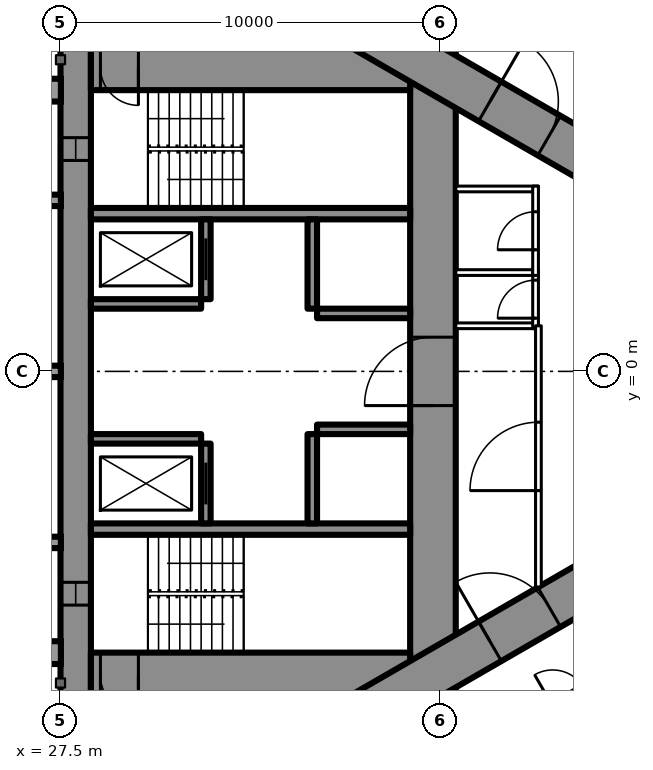
"""IFC4 building model, lengths in metres.
Left out: names, types, materials, properties, quantities, classifications, styles, units other than length and angle.
Written with IfcOpenShell. Run it as: python <this file> out.ifc"""

import sys

from ifc_helpers import new_model, si_unit, direction, frame, frame_2d, origin, place, context, subcontext, project, spatial, rectangle, extrude, element, fill, save


model = new_model("IFC4")
c1 = context("Model", 3, precision=1e-05, world=origin(), true_north=direction((0.0, 1.0)))
c2 = subcontext(c1, "Body", "Model", "MODEL_VIEW")
j1 = project(units=[si_unit("LENGTHUNIT", "METRE"), si_unit("PLANEANGLEUNIT", "RADIAN")], contexts=[c1])
p1 = place(None, origin())
s1 = spatial("IfcSite", under=j1, at=p1, CompositionType="ELEMENT")
p2 = place(p1, origin())
s2 = spatial("IfcBuilding", under=s1, at=p2, CompositionType="ELEMENT")
p3 = place(p2, frame((0.0, 0.0, 32.0)))
s3 = spatial("IfcBuildingStorey", under=s2, at=p3, CompositionType="ELEMENT", Elevation=32.0)
p4 = place(p3, frame((27.9, -8.6, 0.0), z_axis=(0.0, 0.0, 1.0), x_axis=(0.0, 1.0, 0.0)))
e1 = element("IfcWall", 1, at=p4, inside=s3, PredefinedType="SHEAR", context=c2, shape_type="SweptSolid", body=[
    extrude(rectangle(XDim=17.2, YDim=0.8, at=frame_2d((8.6, 0.0))), origin(), (0.0, 0.0, 1.0), 3.5),
])
p5 = place(p4, frame((2.45, 0.0, 0.6)))
e2 = element("IfcOpeningElement", 2, at=p5, cuts=e1, PredefinedType="OPENING", context=c2, shape_type="SweptSolid", body=[
    extrude(rectangle(XDim=0.6, YDim=2.1, at=frame_2d((0.3, 1.05))), frame((0.0, 0.41, 0.0), z_axis=(0.0, -1.0, 0.0), x_axis=(1.0, 0.0, 0.0)), (0.0, 0.0, 1.0), 0.82),
])
p6 = place(p4, frame((14.15, 0.0, 0.6)))
e3 = element("IfcOpeningElement", 3, at=p6, cuts=e1, PredefinedType="OPENING", context=c2, shape_type="SweptSolid", body=[
    extrude(rectangle(XDim=0.6, YDim=2.1, at=frame_2d((0.3, 1.05))), frame((0.0, 0.41, 0.0), z_axis=(0.0, -1.0, 0.0), x_axis=(1.0, 0.0, 0.0)), (0.0, 0.0, 1.0), 0.82),
])
p7 = place(p3, frame((37.3, -8.6, 0.0), z_axis=(0.0, 0.0, 1.0), x_axis=(0.0, 1.0, 0.0)))
e4 = element("IfcWall", 4, at=p7, inside=s3, PredefinedType="SHEAR", context=c2, shape_type="SweptSolid", body=[
    extrude(rectangle(XDim=17.2, YDim=1.2, at=frame_2d((8.6, 0.0))), origin(), (0.0, 0.0, 1.0), 3.5),
])
p8 = place(p7, frame((7.7, 0.0, 0.0)))
e5 = element("IfcOpeningElement", 5, at=p8, cuts=e4, PredefinedType="OPENING", context=c2, shape_type="SweptSolid", body=[
    extrude(rectangle(XDim=1.8, YDim=2.2, at=frame_2d((0.9, 1.1))), frame((0.0, 0.61, 0.0), z_axis=(0.0, -1.0, 0.0), x_axis=(1.0, 0.0, 0.0)), (0.0, 0.0, 1.0), 1.22),
])
p9 = place(p3, frame((28.3, -8.0, 0.0), z_axis=(0.0, 0.0, 1.0), x_axis=(1.0, 0.0, 0.0)))
e6 = element("IfcWall", 6, at=p9, inside=s3, PredefinedType="SHEAR", context=c2, shape_type="SweptSolid", body=[
    extrude(rectangle(XDim=8.4, YDim=1.2, at=frame_2d((4.2, 0.0))), origin(), (0.0, 0.0, 1.0), 3.5),
])
p10 = place(p9, frame((0.25, 0.0, 0.0)))
e7 = element("IfcOpeningElement", 7, at=p10, cuts=e6, PredefinedType="OPENING", context=c2, shape_type="SweptSolid", body=[
    extrude(rectangle(XDim=1.0, YDim=2.2, at=frame_2d((0.5, 1.1))), frame((0.0, 0.61, 0.0), z_axis=(0.0, -1.0, 0.0), x_axis=(1.0, 0.0, 0.0)), (0.0, 0.0, 1.0), 1.22),
])
p11 = place(p3, frame((28.3, 8.0, 0.0), z_axis=(0.0, 0.0, 1.0), x_axis=(1.0, 0.0, 0.0)))
e8 = element("IfcWall", 8, at=p11, inside=s3, PredefinedType="SHEAR", context=c2, shape_type="SweptSolid", body=[
    extrude(rectangle(XDim=8.4, YDim=1.2, at=frame_2d((4.2, 0.0))), origin(), (0.0, 0.0, 1.0), 3.5),
])
p12 = place(p11, frame((0.25, 0.0, 0.0)))
e9 = element("IfcOpeningElement", 9, at=p12, cuts=e8, PredefinedType="OPENING", context=c2, shape_type="SweptSolid", body=[
    extrude(rectangle(XDim=1.0, YDim=2.2, at=frame_2d((0.5, 1.1))), frame((0.0, 0.61, 0.0), z_axis=(0.0, -1.0, 0.0), x_axis=(1.0, 0.0, 0.0)), (0.0, 0.0, 1.0), 1.22),
])
for number, where, z_axis, x_axis in (
    (10, (28.3, -4.15, 0.0), (0.0, 0.0, 1.0), (1.0, 0.0, 0.0)),
    (11, (28.3, 4.15, 0.0), (0.0, 0.0, 1.0), (1.0, 0.0, 0.0)),
):
    element("IfcWall", number, at=place(p3, frame(where, z_axis=z_axis, x_axis=x_axis)), inside=s3, PredefinedType="SHEAR", context=c2, shape_type="SweptSolid", body=[
        extrude(rectangle(XDim=8.4, YDim=0.3, at=frame_2d((4.2, 0.0))), origin(), (0.0, 0.0, 1.0), 3.5),
    ])
p13 = place(p3, frame((31.325, -4.0, 0.0), z_axis=(0.0, 0.0, 1.0), x_axis=(0.0, 1.0, 0.0)))
e12 = element("IfcWall", 12, at=p13, inside=s3, PredefinedType="SHEAR", context=c2, shape_type="SweptSolid", body=[
    extrude(rectangle(XDim=2.1, YDim=0.25, at=frame_2d((1.05, 0.0))), origin(), (0.0, 0.0, 1.0), 3.5),
])
p14 = place(p13, frame((0.5, 0.0, 0.0)))
e13 = element("IfcOpeningElement", 13, at=p14, cuts=e12, PredefinedType="OPENING", context=c2, shape_type="SweptSolid", body=[
    extrude(rectangle(XDim=1.1, YDim=2.2, at=frame_2d((0.55, 1.1))), frame((0.0, 0.135, 0.0), z_axis=(0.0, -1.0, 0.0), x_axis=(1.0, 0.0, 0.0)), (0.0, 0.0, 1.0), 0.27),
])
p15 = place(p3, frame((34.125, -4.0, 0.0), z_axis=(0.0, 0.0, 1.0), x_axis=(0.0, 1.0, 0.0)))
e14 = element("IfcWall", 14, at=p15, inside=s3, PredefinedType="SHEAR", context=c2, shape_type="SweptSolid", body=[
    extrude(rectangle(XDim=2.35, YDim=0.25, at=frame_2d((1.175, 0.0))), origin(), (0.0, 0.0, 1.0), 3.5),
])
p16 = place(p3, frame((28.3, -1.775, 0.0), z_axis=(0.0, 0.0, 1.0), x_axis=(1.0, 0.0, 0.0)))
e15 = element("IfcWall", 15, at=p16, inside=s3, PredefinedType="SHEAR", context=c2, shape_type="SweptSolid", body=[
    extrude(rectangle(XDim=2.9, YDim=0.25, at=frame_2d((1.45, 0.0))), origin(), (0.0, 0.0, 1.0), 3.5),
])
p17 = place(p3, frame((34.25, -1.525, 0.0), z_axis=(0.0, 0.0, 1.0), x_axis=(1.0, 0.0, 0.0)))
e16 = element("IfcWall", 16, at=p17, inside=s3, PredefinedType="SHEAR", context=c2, shape_type="SweptSolid", body=[
    extrude(rectangle(XDim=2.45, YDim=0.25, at=frame_2d((1.225, 0.0))), origin(), (0.0, 0.0, 1.0), 3.5),
])
p18 = place(p3, frame((31.325, 1.9, 0.0), z_axis=(0.0, 0.0, 1.0), x_axis=(0.0, 1.0, 0.0)))
e17 = element("IfcWall", 17, at=p18, inside=s3, PredefinedType="SHEAR", context=c2, shape_type="SweptSolid", body=[
    extrude(rectangle(XDim=2.1, YDim=0.25, at=frame_2d((1.05, 0.0))), origin(), (0.0, 0.0, 1.0), 3.5),
])
p19 = place(p18, frame((0.5, 0.0, 0.0)))
e18 = element("IfcOpeningElement", 18, at=p19, cuts=e17, PredefinedType="OPENING", context=c2, shape_type="SweptSolid", body=[
    extrude(rectangle(XDim=1.1, YDim=2.2, at=frame_2d((0.55, 1.1))), frame((0.0, 0.135, 0.0), z_axis=(0.0, -1.0, 0.0), x_axis=(1.0, 0.0, 0.0)), (0.0, 0.0, 1.0), 0.27),
])
p20 = place(p3, frame((34.125, 1.65, 0.0), z_axis=(0.0, 0.0, 1.0), x_axis=(0.0, 1.0, 0.0)))
e19 = element("IfcWall", 19, at=p20, inside=s3, PredefinedType="SHEAR", context=c2, shape_type="SweptSolid", body=[
    extrude(rectangle(XDim=2.35, YDim=0.25, at=frame_2d((1.175, 0.0))), origin(), (0.0, 0.0, 1.0), 3.5),
])
p21 = place(p3, frame((28.3, 1.775, 0.0), z_axis=(0.0, 0.0, 1.0), x_axis=(1.0, 0.0, 0.0)))
e20 = element("IfcWall", 20, at=p21, inside=s3, PredefinedType="SHEAR", context=c2, shape_type="SweptSolid", body=[
    extrude(rectangle(XDim=2.9, YDim=0.25, at=frame_2d((1.45, 0.0))), origin(), (0.0, 0.0, 1.0), 3.5),
])
p22 = place(p3, frame((34.25, 1.525, 0.0), z_axis=(0.0, 0.0, 1.0), x_axis=(1.0, 0.0, 0.0)))
e21 = element("IfcWall", 21, at=p22, inside=s3, PredefinedType="SHEAR", context=c2, shape_type="SweptSolid", body=[
    extrude(rectangle(XDim=2.45, YDim=0.25, at=frame_2d((1.225, 0.0))), origin(), (0.0, 0.0, 1.0), 3.5),
])
p23 = place(p3, frame((27.2, -13.8, 0.0), z_axis=(0.0, 0.0, 1.0), x_axis=(0.866027159892, 0.499996958321, 0.0)))
e22 = element("IfcWall", 22, at=p23, inside=s3, PredefinedType="SHEAR", context=c2, shape_type="SweptSolid", body=[
    extrude(rectangle(XDim=27.947, YDim=1.2, at=frame_2d((13.973, 0.0))), origin(), (0.0, 0.0, 1.0), 3.5),
])
p24 = place(p23, frame((4.6, 0.0, 0.0)))
e23 = element("IfcOpeningElement", 23, at=p24, cuts=e22, PredefinedType="OPENING", context=c2, shape_type="SweptSolid", body=[
    extrude(rectangle(XDim=1.0, YDim=2.2, at=frame_2d((0.5, 1.1))), frame((0.0, 0.61, 0.0), z_axis=(0.0, -1.0, 0.0), x_axis=(1.0, 0.0, 0.0)), (0.0, 0.0, 1.0), 1.22),
])
p25 = place(p23, frame((13.395, 0.0, 0.0)))
e24 = element("IfcOpeningElement", 24, at=p25, cuts=e22, PredefinedType="OPENING", context=c2, shape_type="SweptSolid", body=[
    extrude(rectangle(XDim=1.8, YDim=2.2, at=frame_2d((0.9, 1.1))), frame((0.0, 0.61, 0.0), z_axis=(0.0, -1.0, 0.0), x_axis=(1.0, 0.0, 0.0)), (0.0, 0.0, 1.0), 1.22),
])
p26 = place(p3, frame((27.2, 13.8, 0.0), z_axis=(0.0, 0.0, 1.0), x_axis=(0.866024515034, -0.500001539357, 0.0)))
e25 = element("IfcWall", 25, at=p26, inside=s3, PredefinedType="SHEAR", context=c2, shape_type="SweptSolid", body=[
    extrude(rectangle(XDim=26.907, YDim=1.2, at=frame_2d((13.454, 0.0))), origin(), (0.0, 0.0, 1.0), 3.5),
])
p27 = place(p26, frame((4.6, 0.0, 0.0)))
e26 = element("IfcOpeningElement", 26, at=p27, cuts=e25, PredefinedType="OPENING", context=c2, shape_type="SweptSolid", body=[
    extrude(rectangle(XDim=1.0, YDim=2.2, at=frame_2d((0.5, 1.1))), frame((0.0, 0.61, 0.0), z_axis=(0.0, -1.0, 0.0), x_axis=(1.0, 0.0, 0.0)), (0.0, 0.0, 1.0), 1.22),
])
p28 = place(p26, frame((13.395, 0.0, 0.0)))
e27 = element("IfcOpeningElement", 27, at=p28, cuts=e25, PredefinedType="OPENING", context=c2, shape_type="SweptSolid", body=[
    extrude(rectangle(XDim=1.8, YDim=2.2, at=frame_2d((0.9, 1.1))), frame((0.0, 0.61, 0.0), z_axis=(0.0, -1.0, 0.0), x_axis=(1.0, 0.0, 0.0)), (0.0, 0.0, 1.0), 1.22),
])
p29 = place(p3, frame((37.96, -10.243, 0.0), z_axis=(0.0, 0.0, 1.0), x_axis=(0.866026429433, 0.499998223521, 0.0)))
e28 = element("IfcWall", 28, at=p29, inside=s3, PredefinedType="PARTITIONING", context=c2, shape_type="SweptSolid", body=[
    extrude(rectangle(XDim=20.487, YDim=0.2, at=frame_2d((10.243, 0.0))), origin(), (0.0, 0.0, 1.0), 3.25),
])
p30 = place(p29, frame((4.575, 0.0, 0.0)))
e29 = element("IfcOpeningElement", 29, at=p30, cuts=e28, PredefinedType="OPENING", context=c2, shape_type="SweptSolid", body=[
    extrude(rectangle(XDim=0.95, YDim=2.2, at=frame_2d((0.475, 1.1))), frame((0.0, 0.11, 0.0), z_axis=(0.0, -1.0, 0.0), x_axis=(1.0, 0.0, 0.0)), (0.0, 0.0, 1.0), 0.22),
])
p31 = place(p29, frame((9.199, 0.0, 0.0)))
e30 = element("IfcOpeningElement", 30, at=p31, cuts=e28, PredefinedType="OPENING", context=c2, shape_type="SweptSolid", body=[
    extrude(rectangle(XDim=0.95, YDim=2.2, at=frame_2d((0.475, 1.1))), frame((0.0, 0.11, 0.0), z_axis=(0.0, -1.0, 0.0), x_axis=(1.0, 0.0, 0.0)), (0.0, 0.0, 1.0), 0.22),
])
p32 = place(p29, frame((15.599, 0.0, 0.0)))
e31 = element("IfcOpeningElement", 31, at=p32, cuts=e28, PredefinedType="OPENING", context=c2, shape_type="SweptSolid", body=[
    extrude(rectangle(XDim=0.95, YDim=2.2, at=frame_2d((0.475, 1.1))), frame((0.0, 0.11, 0.0), z_axis=(0.0, -1.0, 0.0), x_axis=(1.0, 0.0, 0.0)), (0.0, 0.0, 1.0), 0.22),
])
p33 = place(p29, frame((2.875, 0.0, 0.0)))
e32 = element("IfcOpeningElement", 32, at=p33, cuts=e28, PredefinedType="OPENING", context=c2, shape_type="SweptSolid", body=[
    extrude(rectangle(XDim=0.95, YDim=2.2, at=frame_2d((0.475, 1.1))), frame((0.0, 0.11, 0.0), z_axis=(0.0, -1.0, 0.0), x_axis=(1.0, 0.0, 0.0)), (0.0, 0.0, 1.0), 0.22),
])
for number, where, z_axis, x_axis in (
    (33, (37.9, 1.2, 0.0), (0.0, 0.0, 1.0), (1.0, 0.0, 0.0)),
    (34, (37.9, 2.6, 0.0), (0.0, 0.0, 1.0), (1.0, 0.0, 0.0)),
    (35, (37.9, 4.8, 0.0), (0.0, 0.0, 1.0), (1.0, 0.0, 0.0)),
):
    element("IfcWall", number, at=place(p3, frame(where, z_axis=z_axis, x_axis=x_axis)), inside=s3, PredefinedType="PARTITIONING", context=c2, shape_type="SweptSolid", body=[
        extrude(rectangle(XDim=2.175, YDim=0.15, at=frame_2d((1.087, 0.0))), origin(), (0.0, 0.0, 1.0), 3.25),
    ])
p34 = place(p3, frame((40.0, 1.125, 0.0), z_axis=(0.0, 0.0, 1.0), x_axis=(0.0, 1.0, 0.0)))
e36 = element("IfcWall", 36, at=p34, inside=s3, PredefinedType="PARTITIONING", context=c2, shape_type="SweptSolid", body=[
    extrude(rectangle(XDim=1.55, YDim=0.15, at=frame_2d((0.775, 0.0))), origin(), (0.0, 0.0, 1.0), 3.25),
])
p35 = place(p34, frame((0.275, 0.0, 0.0)))
e37 = element("IfcOpeningElement", 37, at=p35, cuts=e36, PredefinedType="OPENING", context=c2, shape_type="SweptSolid", body=[
    extrude(rectangle(XDim=1.0, YDim=2.2, at=frame_2d((0.5, 1.1))), frame((0.0, 0.085, 0.0), z_axis=(0.0, -1.0, 0.0), x_axis=(1.0, 0.0, 0.0)), (0.0, 0.0, 1.0), 0.17),
])
p36 = place(p3, frame((40.0, 2.525, 0.0), z_axis=(0.0, 0.0, 1.0), x_axis=(0.0, 1.0, 0.0)))
e38 = element("IfcWall", 38, at=p36, inside=s3, PredefinedType="PARTITIONING", context=c2, shape_type="SweptSolid", body=[
    extrude(rectangle(XDim=2.35, YDim=0.15, at=frame_2d((1.175, 0.0))), origin(), (0.0, 0.0, 1.0), 3.25),
])
p37 = place(p36, frame((0.675, 0.0, 0.0)))
e39 = element("IfcOpeningElement", 39, at=p37, cuts=e38, PredefinedType="OPENING", context=c2, shape_type="SweptSolid", body=[
    extrude(rectangle(XDim=1.0, YDim=2.2, at=frame_2d((0.5, 1.1))), frame((0.0, 0.085, 0.0), z_axis=(0.0, -1.0, 0.0), x_axis=(1.0, 0.0, 0.0)), (0.0, 0.0, 1.0), 0.17),
])
p38 = place(p3, frame((40.075, -5.674, 0.0), z_axis=(0.0, 0.0, 1.0), x_axis=(0.0, 1.0, 0.0)))
e40 = element("IfcWall", 40, at=p38, inside=s3, PredefinedType="PARTITIONING", context=c2, shape_type="SweptSolid", body=[
    extrude(rectangle(XDim=6.874, YDim=0.15, at=frame_2d((3.437, 0.0))), origin(), (0.0, 0.0, 1.0), 3.25),
])
p39 = place(p38, frame((2.537, 0.0, 0.0)))
e41 = element("IfcOpeningElement", 41, at=p39, cuts=e40, PredefinedType="OPENING", context=c2, shape_type="SweptSolid", body=[
    extrude(rectangle(XDim=1.8, YDim=2.2, at=frame_2d((0.9, 1.1))), frame((0.0, 0.085, 0.0), z_axis=(0.0, -1.0, 0.0), x_axis=(1.0, 0.0, 0.0)), (0.0, 0.0, 1.0), 0.17),
])
p40 = place(p33, origin())
e42 = element("IfcDoor", 42, at=p40, inside=s3, OperationType="SINGLE_SWING_LEFT", PredefinedType="DOOR", context=c2, shape_type="SweptSolid", body=[
    extrude(rectangle(XDim=0.95, YDim=2.2, at=frame_2d((0.475, 1.1))), frame((0.0, 0.025, 0.0), z_axis=(0.0, -1.0, 0.0), x_axis=(1.0, 0.0, 0.0)), (0.0, 0.0, 1.0), 0.05),
])
fill(e32, e42)
p41 = place(p35, origin())
e43 = element("IfcDoor", 43, at=p41, inside=s3, OperationType="SINGLE_SWING_LEFT", PredefinedType="DOOR", context=c2, shape_type="SweptSolid", body=[
    extrude(rectangle(XDim=1.0, YDim=2.2, at=frame_2d((0.5, 1.1))), frame((0.0, 0.025, 0.0), z_axis=(0.0, -1.0, 0.0), x_axis=(1.0, 0.0, 0.0)), (0.0, 0.0, 1.0), 0.05),
])
fill(e37, e43)
p42 = place(p37, origin())
e44 = element("IfcDoor", 44, at=p42, inside=s3, OperationType="SINGLE_SWING_LEFT", PredefinedType="DOOR", context=c2, shape_type="SweptSolid", body=[
    extrude(rectangle(XDim=1.0, YDim=2.2, at=frame_2d((0.5, 1.1))), frame((0.0, 0.025, 0.0), z_axis=(0.0, -1.0, 0.0), x_axis=(1.0, 0.0, 0.0)), (0.0, 0.0, 1.0), 0.05),
])
fill(e39, e44)
p43 = place(p39, origin())
e45 = element("IfcDoor", 45, at=p43, inside=s3, OperationType="DOUBLE_DOOR_SINGLE_SWING", PredefinedType="DOOR", context=c2, shape_type="SweptSolid", body=[
    extrude(rectangle(XDim=1.8, YDim=2.2, at=frame_2d((0.9, 1.1))), frame((0.0, 0.025, 0.0), z_axis=(0.0, -1.0, 0.0), x_axis=(1.0, 0.0, 0.0)), (0.0, 0.0, 1.0), 0.05),
])
fill(e41, e45)
p44 = place(p25, origin())
e46 = element("IfcDoor", 46, at=p44, inside=s3, OperationType="DOUBLE_DOOR_SINGLE_SWING", PredefinedType="DOOR", context=c2, shape_type="SweptSolid", body=[
    extrude(rectangle(XDim=1.8, YDim=2.2, at=frame_2d((0.9, 1.1))), frame((0.0, 0.025, 0.0), z_axis=(0.0, -1.0, 0.0), x_axis=(1.0, 0.0, 0.0)), (0.0, 0.0, 1.0), 0.05),
])
fill(e24, e46)
p45 = place(p28, origin())
e47 = element("IfcDoor", 47, at=p45, inside=s3, OperationType="DOUBLE_DOOR_SINGLE_SWING", PredefinedType="DOOR", context=c2, shape_type="SweptSolid", body=[
    extrude(rectangle(XDim=1.8, YDim=2.2, at=frame_2d((0.9, 1.1))), frame((0.0, 0.025, 0.0), z_axis=(0.0, -1.0, 0.0), x_axis=(1.0, 0.0, 0.0)), (0.0, 0.0, 1.0), 0.05),
])
fill(e27, e47)
p46 = place(p8, origin())
e48 = element("IfcDoor", 48, at=p46, inside=s3, OperationType="DOUBLE_DOOR_SINGLE_SWING", PredefinedType="DOOR", context=c2, shape_type="SweptSolid", body=[
    extrude(rectangle(XDim=1.8, YDim=2.2, at=frame_2d((0.9, 1.1))), frame((0.0, 0.025, 0.0), z_axis=(0.0, -1.0, 0.0), x_axis=(1.0, 0.0, 0.0)), (0.0, 0.0, 1.0), 0.05),
])
fill(e5, e48)
p47 = place(p10, origin())
e49 = element("IfcDoor", 49, at=p47, inside=s3, OperationType="SINGLE_SWING_RIGHT", PredefinedType="DOOR", context=c2, shape_type="SweptSolid", body=[
    extrude(rectangle(XDim=1.0, YDim=2.2, at=frame_2d((0.5, 1.1))), frame((0.0, 0.025, 0.0), z_axis=(0.0, -1.0, 0.0), x_axis=(1.0, 0.0, 0.0)), (0.0, 0.0, 1.0), 0.05),
])
fill(e7, e49)
p48 = place(p12, origin())
e50 = element("IfcDoor", 50, at=p48, inside=s3, OperationType="SINGLE_SWING_RIGHT", PredefinedType="DOOR", context=c2, shape_type="SweptSolid", body=[
    extrude(rectangle(XDim=1.0, YDim=2.2, at=frame_2d((0.5, 1.1))), frame((0.0, 0.025, 0.0), z_axis=(0.0, -1.0, 0.0), x_axis=(1.0, 0.0, 0.0)), (0.0, 0.0, 1.0), 0.05),
])
fill(e9, e50)
p49 = place(p14, origin())
e51 = element("IfcDoor", 51, at=p49, inside=s3, OperationType="SLIDING_TO_LEFT", PredefinedType="USERDEFINED", context=c2, shape_type="SweptSolid", body=[
    extrude(rectangle(XDim=1.1, YDim=2.2, at=frame_2d((0.55, 1.1))), frame((0.0, 0.025, 0.0), z_axis=(0.0, -1.0, 0.0), x_axis=(1.0, 0.0, 0.0)), (0.0, 0.0, 1.0), 0.05),
])
fill(e13, e51)
p50 = place(p19, origin())
e52 = element("IfcDoor", 52, at=p50, inside=s3, OperationType="SLIDING_TO_LEFT", PredefinedType="USERDEFINED", context=c2, shape_type="SweptSolid", body=[
    extrude(rectangle(XDim=1.1, YDim=2.2, at=frame_2d((0.55, 1.1))), frame((0.0, 0.025, 0.0), z_axis=(0.0, -1.0, 0.0), x_axis=(1.0, 0.0, 0.0)), (0.0, 0.0, 1.0), 0.05),
])
fill(e18, e52)
p51 = place(p5, origin())
e53 = element("IfcWindow", 53, at=p51, inside=s3, PartitioningType="SINGLE_PANEL", PredefinedType="WINDOW", context=c2, shape_type="SweptSolid", body=[
    extrude(rectangle(XDim=0.6, YDim=2.1, at=frame_2d((0.3, 1.05))), frame((0.0, 0.03, 0.0), z_axis=(0.0, -1.0, 0.0), x_axis=(1.0, 0.0, 0.0)), (0.0, 0.0, 1.0), 0.06),
])
fill(e2, e53)
p52 = place(p6, origin())
e54 = element("IfcWindow", 54, at=p52, inside=s3, PartitioningType="SINGLE_PANEL", PredefinedType="WINDOW", context=c2, shape_type="SweptSolid", body=[
    extrude(rectangle(XDim=0.6, YDim=2.1, at=frame_2d((0.3, 1.05))), frame((0.0, 0.03, 0.0), z_axis=(0.0, -1.0, 0.0), x_axis=(1.0, 0.0, 0.0)), (0.0, 0.0, 1.0), 0.06),
])
fill(e3, e54)
save(model, sys.argv[1])
